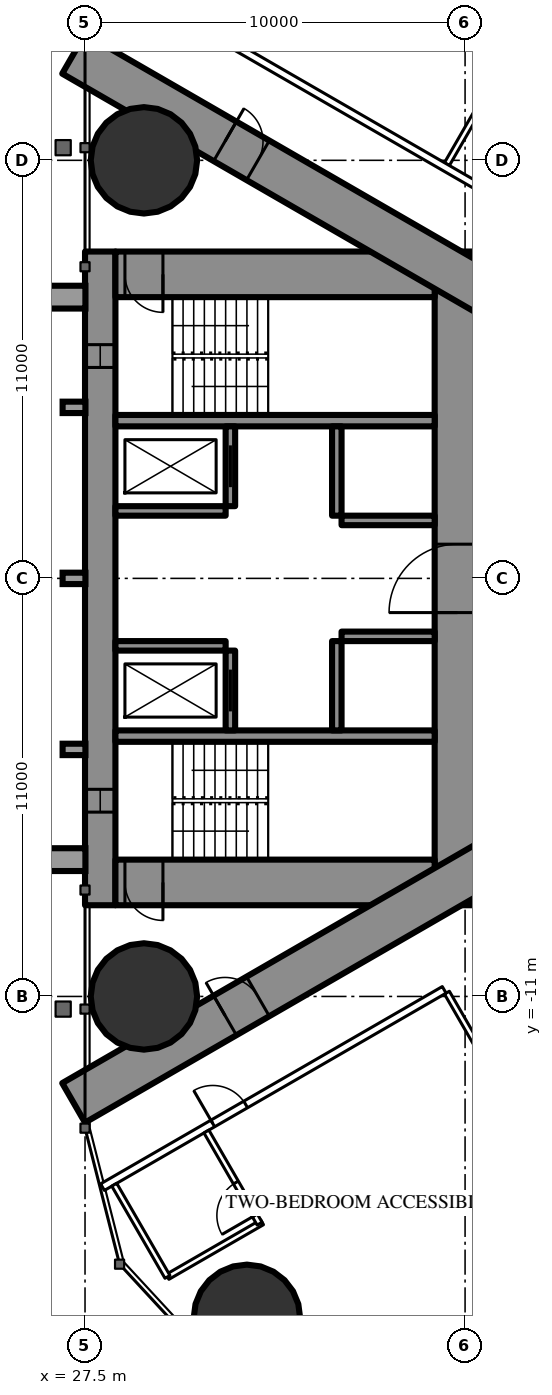
"""IFC4 building model, lengths in metres.
Left out: names, types, materials, properties, quantities, classifications, styles, units other than length and angle.
Written with IfcOpenShell. Run it as: python <this file> out.ifc"""

import sys

from ifc_helpers import new_model, si_unit, direction, frame, frame_2d, origin, origin_2d, place, context, subcontext, project, spatial, rectangle, circle, extrude, element, fill, save


model = new_model("IFC4")
c1 = context("Model", 3, precision=1e-05, world=origin(), true_north=direction((0.0, 1.0)))
c2 = subcontext(c1, "Body", "Model", "MODEL_VIEW")
j1 = project(units=[si_unit("LENGTHUNIT", "METRE"), si_unit("PLANEANGLEUNIT", "RADIAN")], contexts=[c1])
p1 = place(None, origin())
s1 = spatial("IfcSite", under=j1, at=p1, CompositionType="ELEMENT")
p2 = place(p1, origin())
s2 = spatial("IfcBuilding", under=s1, at=p2, CompositionType="ELEMENT")
p3 = place(p2, frame((0.0, 0.0, 166.8)))
s3 = spatial("IfcBuildingStorey", under=s2, at=p3, CompositionType="ELEMENT", Elevation=166.8)
for number, where, z_axis, x_axis in (
    (1, (31.76, -19.456, 0.0), (0.0, 0.0, 1.0), (1.0, 0.0, 0.0)),
    (2, (29.05, 11.0, 0.0), (0.0, 0.0, 1.0), (1.0, 0.0, 0.0)),
    (3, (29.05, -11.0, 0.0), (0.0, 0.0, 1.0), (1.0, 0.0, 0.0)),
):
    element("IfcColumn", number, at=place(p3, frame(where, z_axis=z_axis, x_axis=x_axis)), inside=s3, PredefinedType="COLUMN", context=c2, shape_type="SweptSolid", body=[
        extrude(circle(Radius=1.4, at=origin_2d()), origin(), (0.0, 0.0, 1.0), 3.5),
    ])
p4 = place(p3, frame((27.9, -8.6, 0.0), z_axis=(0.0, 0.0, 1.0), x_axis=(0.0, 1.0, 0.0)))
e4 = element("IfcWall", 4, at=p4, inside=s3, PredefinedType="SHEAR", context=c2, shape_type="SweptSolid", body=[
    extrude(rectangle(XDim=17.2, YDim=0.8, at=frame_2d((8.6, 0.0))), origin(), (0.0, 0.0, 1.0), 3.5),
])
p5 = place(p4, frame((2.45, 0.0, 0.6)))
e5 = element("IfcOpeningElement", 5, at=p5, cuts=e4, PredefinedType="OPENING", context=c2, shape_type="SweptSolid", body=[
    extrude(rectangle(XDim=0.6, YDim=2.1, at=frame_2d((0.3, 1.05))), frame((0.0, 0.41, 0.0), z_axis=(0.0, -1.0, 0.0), x_axis=(1.0, 0.0, 0.0)), (0.0, 0.0, 1.0), 0.82),
])
p6 = place(p4, frame((14.15, 0.0, 0.6)))
e6 = element("IfcOpeningElement", 6, at=p6, cuts=e4, PredefinedType="OPENING", context=c2, shape_type="SweptSolid", body=[
    extrude(rectangle(XDim=0.6, YDim=2.1, at=frame_2d((0.3, 1.05))), frame((0.0, 0.41, 0.0), z_axis=(0.0, -1.0, 0.0), x_axis=(1.0, 0.0, 0.0)), (0.0, 0.0, 1.0), 0.82),
])
p7 = place(p3, frame((37.3, -8.6, 0.0), z_axis=(0.0, 0.0, 1.0), x_axis=(0.0, 1.0, 0.0)))
e7 = element("IfcWall", 7, at=p7, inside=s3, PredefinedType="SHEAR", context=c2, shape_type="SweptSolid", body=[
    extrude(rectangle(XDim=17.2, YDim=1.2, at=frame_2d((8.6, 0.0))), origin(), (0.0, 0.0, 1.0), 3.5),
])
p8 = place(p7, frame((7.7, 0.0, 0.0)))
e8 = element("IfcOpeningElement", 8, at=p8, cuts=e7, PredefinedType="OPENING", context=c2, shape_type="SweptSolid", body=[
    extrude(rectangle(XDim=1.8, YDim=2.2, at=frame_2d((0.9, 1.1))), frame((0.0, 0.61, 0.0), z_axis=(0.0, -1.0, 0.0), x_axis=(1.0, 0.0, 0.0)), (0.0, 0.0, 1.0), 1.22),
])
p9 = place(p3, frame((28.3, -8.0, 0.0), z_axis=(0.0, 0.0, 1.0), x_axis=(1.0, 0.0, 0.0)))
e9 = element("IfcWall", 9, at=p9, inside=s3, PredefinedType="SHEAR", context=c2, shape_type="SweptSolid", body=[
    extrude(rectangle(XDim=8.4, YDim=1.2, at=frame_2d((4.2, 0.0))), origin(), (0.0, 0.0, 1.0), 3.5),
])
p10 = place(p9, frame((0.25, 0.0, 0.0)))
e10 = element("IfcOpeningElement", 10, at=p10, cuts=e9, PredefinedType="OPENING", context=c2, shape_type="SweptSolid", body=[
    extrude(rectangle(XDim=1.0, YDim=2.2, at=frame_2d((0.5, 1.1))), frame((0.0, 0.61, 0.0), z_axis=(0.0, -1.0, 0.0), x_axis=(1.0, 0.0, 0.0)), (0.0, 0.0, 1.0), 1.22),
])
p11 = place(p3, frame((28.3, 8.0, 0.0), z_axis=(0.0, 0.0, 1.0), x_axis=(1.0, 0.0, 0.0)))
e11 = element("IfcWall", 11, at=p11, inside=s3, PredefinedType="SHEAR", context=c2, shape_type="SweptSolid", body=[
    extrude(rectangle(XDim=8.4, YDim=1.2, at=frame_2d((4.2, 0.0))), origin(), (0.0, 0.0, 1.0), 3.5),
])
p12 = place(p11, frame((0.25, 0.0, 0.0)))
e12 = element("IfcOpeningElement", 12, at=p12, cuts=e11, PredefinedType="OPENING", context=c2, shape_type="SweptSolid", body=[
    extrude(rectangle(XDim=1.0, YDim=2.2, at=frame_2d((0.5, 1.1))), frame((0.0, 0.61, 0.0), z_axis=(0.0, -1.0, 0.0), x_axis=(1.0, 0.0, 0.0)), (0.0, 0.0, 1.0), 1.22),
])
for number, where, z_axis, x_axis in (
    (13, (28.3, -4.15, 0.0), (0.0, 0.0, 1.0), (1.0, 0.0, 0.0)),
    (14, (28.3, 4.15, 0.0), (0.0, 0.0, 1.0), (1.0, 0.0, 0.0)),
):
    element("IfcWall", number, at=place(p3, frame(where, z_axis=z_axis, x_axis=x_axis)), inside=s3, PredefinedType="SHEAR", context=c2, shape_type="SweptSolid", body=[
        extrude(rectangle(XDim=8.4, YDim=0.3, at=frame_2d((4.2, 0.0))), origin(), (0.0, 0.0, 1.0), 3.5),
    ])
p13 = place(p3, frame((31.325, -4.0, 0.0), z_axis=(0.0, 0.0, 1.0), x_axis=(0.0, 1.0, 0.0)))
e15 = element("IfcWall", 15, at=p13, inside=s3, PredefinedType="SHEAR", context=c2, shape_type="SweptSolid", body=[
    extrude(rectangle(XDim=2.1, YDim=0.25, at=frame_2d((1.05, 0.0))), origin(), (0.0, 0.0, 1.0), 3.5),
])
p14 = place(p13, frame((0.5, 0.0, 0.0)))
e16 = element("IfcOpeningElement", 16, at=p14, cuts=e15, PredefinedType="OPENING", context=c2, shape_type="SweptSolid", body=[
    extrude(rectangle(XDim=1.1, YDim=2.2, at=frame_2d((0.55, 1.1))), frame((0.0, 0.135, 0.0), z_axis=(0.0, -1.0, 0.0), x_axis=(1.0, 0.0, 0.0)), (0.0, 0.0, 1.0), 0.27),
])
p15 = place(p3, frame((34.125, -4.0, 0.0), z_axis=(0.0, 0.0, 1.0), x_axis=(0.0, 1.0, 0.0)))
e17 = element("IfcWall", 17, at=p15, inside=s3, PredefinedType="SHEAR", context=c2, shape_type="SweptSolid", body=[
    extrude(rectangle(XDim=2.35, YDim=0.25, at=frame_2d((1.175, 0.0))), origin(), (0.0, 0.0, 1.0), 3.5),
])
p16 = place(p3, frame((28.3, -1.775, 0.0), z_axis=(0.0, 0.0, 1.0), x_axis=(1.0, 0.0, 0.0)))
e18 = element("IfcWall", 18, at=p16, inside=s3, PredefinedType="SHEAR", context=c2, shape_type="SweptSolid", body=[
    extrude(rectangle(XDim=2.9, YDim=0.25, at=frame_2d((1.45, 0.0))), origin(), (0.0, 0.0, 1.0), 3.5),
])
p17 = place(p3, frame((34.25, -1.525, 0.0), z_axis=(0.0, 0.0, 1.0), x_axis=(1.0, 0.0, 0.0)))
e19 = element("IfcWall", 19, at=p17, inside=s3, PredefinedType="SHEAR", context=c2, shape_type="SweptSolid", body=[
    extrude(rectangle(XDim=2.45, YDim=0.25, at=frame_2d((1.225, 0.0))), origin(), (0.0, 0.0, 1.0), 3.5),
])
p18 = place(p3, frame((31.325, 1.9, 0.0), z_axis=(0.0, 0.0, 1.0), x_axis=(0.0, 1.0, 0.0)))
e20 = element("IfcWall", 20, at=p18, inside=s3, PredefinedType="SHEAR", context=c2, shape_type="SweptSolid", body=[
    extrude(rectangle(XDim=2.1, YDim=0.25, at=frame_2d((1.05, 0.0))), origin(), (0.0, 0.0, 1.0), 3.5),
])
p19 = place(p18, frame((0.5, 0.0, 0.0)))
e21 = element("IfcOpeningElement", 21, at=p19, cuts=e20, PredefinedType="OPENING", context=c2, shape_type="SweptSolid", body=[
    extrude(rectangle(XDim=1.1, YDim=2.2, at=frame_2d((0.55, 1.1))), frame((0.0, 0.135, 0.0), z_axis=(0.0, -1.0, 0.0), x_axis=(1.0, 0.0, 0.0)), (0.0, 0.0, 1.0), 0.27),
])
p20 = place(p3, frame((34.125, 1.65, 0.0), z_axis=(0.0, 0.0, 1.0), x_axis=(0.0, 1.0, 0.0)))
e22 = element("IfcWall", 22, at=p20, inside=s3, PredefinedType="SHEAR", context=c2, shape_type="SweptSolid", body=[
    extrude(rectangle(XDim=2.35, YDim=0.25, at=frame_2d((1.175, 0.0))), origin(), (0.0, 0.0, 1.0), 3.5),
])
p21 = place(p3, frame((28.3, 1.775, 0.0), z_axis=(0.0, 0.0, 1.0), x_axis=(1.0, 0.0, 0.0)))
e23 = element("IfcWall", 23, at=p21, inside=s3, PredefinedType="SHEAR", context=c2, shape_type="SweptSolid", body=[
    extrude(rectangle(XDim=2.9, YDim=0.25, at=frame_2d((1.45, 0.0))), origin(), (0.0, 0.0, 1.0), 3.5),
])
p22 = place(p3, frame((34.25, 1.525, 0.0), z_axis=(0.0, 0.0, 1.0), x_axis=(1.0, 0.0, 0.0)))
e24 = element("IfcWall", 24, at=p22, inside=s3, PredefinedType="SHEAR", context=c2, shape_type="SweptSolid", body=[
    extrude(rectangle(XDim=2.45, YDim=0.25, at=frame_2d((1.225, 0.0))), origin(), (0.0, 0.0, 1.0), 3.5),
])
p23 = place(p3, frame((27.2, -13.8, 0.0), z_axis=(0.0, 0.0, 1.0), x_axis=(0.866027159892, 0.499996958321, 0.0)))
e25 = element("IfcWall", 25, at=p23, inside=s3, PredefinedType="SHEAR", context=c2, shape_type="SweptSolid", body=[
    extrude(rectangle(XDim=27.947, YDim=1.2, at=frame_2d((13.973, 0.0))), origin(), (0.0, 0.0, 1.0), 3.5),
])
p24 = place(p23, frame((4.6, 0.0, 0.0)))
e26 = element("IfcOpeningElement", 26, at=p24, cuts=e25, PredefinedType="OPENING", context=c2, shape_type="SweptSolid", body=[
    extrude(rectangle(XDim=1.0, YDim=2.2, at=frame_2d((0.5, 1.1))), frame((0.0, 0.61, 0.0), z_axis=(0.0, -1.0, 0.0), x_axis=(1.0, 0.0, 0.0)), (0.0, 0.0, 1.0), 1.22),
])
p25 = place(p23, frame((13.395, 0.0, 0.0)))
e27 = element("IfcOpeningElement", 27, at=p25, cuts=e25, PredefinedType="OPENING", context=c2, shape_type="SweptSolid", body=[
    extrude(rectangle(XDim=1.8, YDim=2.2, at=frame_2d((0.9, 1.1))), frame((0.0, 0.61, 0.0), z_axis=(0.0, -1.0, 0.0), x_axis=(1.0, 0.0, 0.0)), (0.0, 0.0, 1.0), 1.22),
])
p26 = place(p3, frame((27.2, 13.8, 0.0), z_axis=(0.0, 0.0, 1.0), x_axis=(0.866024515034, -0.500001539357, 0.0)))
e28 = element("IfcWall", 28, at=p26, inside=s3, PredefinedType="SHEAR", context=c2, shape_type="SweptSolid", body=[
    extrude(rectangle(XDim=26.907, YDim=1.2, at=frame_2d((13.454, 0.0))), origin(), (0.0, 0.0, 1.0), 3.5),
])
p27 = place(p26, frame((4.6, 0.0, 0.0)))
e29 = element("IfcOpeningElement", 29, at=p27, cuts=e28, PredefinedType="OPENING", context=c2, shape_type="SweptSolid", body=[
    extrude(rectangle(XDim=1.0, YDim=2.2, at=frame_2d((0.5, 1.1))), frame((0.0, 0.61, 0.0), z_axis=(0.0, -1.0, 0.0), x_axis=(1.0, 0.0, 0.0)), (0.0, 0.0, 1.0), 1.22),
])
p28 = place(p26, frame((13.395, 0.0, 0.0)))
e30 = element("IfcOpeningElement", 30, at=p28, cuts=e28, PredefinedType="OPENING", context=c2, shape_type="SweptSolid", body=[
    extrude(rectangle(XDim=1.8, YDim=2.2, at=frame_2d((0.9, 1.1))), frame((0.0, 0.61, 0.0), z_axis=(0.0, -1.0, 0.0), x_axis=(1.0, 0.0, 0.0)), (0.0, 0.0, 1.0), 1.22),
])
for number, where, z_axis, x_axis in (
    (31, (37.022, -10.9, 0.0), (0.0, 0.0, 1.0), (0.5, -0.866, 0.0)),
    (32, (37.022, 10.9, 0.0), (0.0, 0.0, 1.0), (0.5, 0.866, 0.0)),
):
    element("IfcWall", number, at=place(p3, frame(where, z_axis=z_axis, x_axis=x_axis)), inside=s3, PredefinedType="PARTITIONING", context=c2, shape_type="SweptSolid", body=[
        extrude(rectangle(XDim=9.77, YDim=0.15, at=frame_2d((4.885, 0.0))), origin(), (0.0, 0.0, 1.0), 3.25),
    ])
p29 = place(p3, frame((27.959, 16.017, 0.0), z_axis=(0.0, 0.0, 1.0), x_axis=(0.866027146794, -0.499996981007, 0.0)))
e33 = element("IfcWall", 33, at=p29, inside=s3, PredefinedType="PARTITIONING", context=c2, shape_type="SweptSolid", body=[
    extrude(rectangle(XDim=21.657, YDim=0.2, at=frame_2d((10.829, 0.0))), origin(), (0.0, 0.0, 1.0), 3.25),
])
p30 = place(p29, frame((15.391, 0.0, 0.0)))
e34 = element("IfcOpeningElement", 34, at=p30, cuts=e33, PredefinedType="OPENING", context=c2, shape_type="SweptSolid", body=[
    extrude(rectangle(XDim=0.95, YDim=2.2, at=frame_2d((0.475, 1.1))), frame((0.0, 0.11, 0.0), z_axis=(0.0, -1.0, 0.0), x_axis=(1.0, 0.0, 0.0)), (0.0, 0.0, 1.0), 0.22),
])
p31 = place(p29, frame((13.409, 0.0, 0.0)))
e35 = element("IfcOpeningElement", 35, at=p31, cuts=e33, PredefinedType="OPENING", context=c2, shape_type="SweptSolid", body=[
    extrude(rectangle(XDim=0.95, YDim=2.2, at=frame_2d((0.475, 1.1))), frame((0.0, 0.11, 0.0), z_axis=(0.0, -1.0, 0.0), x_axis=(1.0, 0.0, 0.0)), (0.0, 0.0, 1.0), 0.22),
])
p32 = place(p29, frame((0.6, 0.0, 0.0)))
e36 = element("IfcOpeningElement", 36, at=p32, cuts=e33, PredefinedType="OPENING", context=c2, shape_type="SweptSolid", body=[
    extrude(rectangle(XDim=0.95, YDim=2.2, at=frame_2d((0.475, 1.1))), frame((0.0, 0.11, 0.0), z_axis=(0.0, -1.0, 0.0), x_axis=(1.0, 0.0, 0.0)), (0.0, 0.0, 1.0), 0.22),
])
p33 = place(p29, frame((19.349, 0.0, 0.0)))
e37 = element("IfcOpeningElement", 37, at=p33, cuts=e33, PredefinedType="OPENING", context=c2, shape_type="SweptSolid", body=[
    extrude(rectangle(XDim=1.8, YDim=2.2, at=frame_2d((0.9, 1.1))), frame((0.0, 0.11, 0.0), z_axis=(0.0, -1.0, 0.0), x_axis=(1.0, 0.0, 0.0)), (0.0, 0.0, 1.0), 0.22),
])
p34 = place(p3, frame((27.959, -16.017, 0.0), z_axis=(0.0, 0.0, 1.0), x_axis=(0.866026201739, 0.499998617899, 0.0)))
e38 = element("IfcWall", 38, at=p34, inside=s3, PredefinedType="PARTITIONING", context=c2, shape_type="SweptSolid", body=[
    extrude(rectangle(XDim=10.382, YDim=0.2, at=frame_2d((5.191, 0.0))), origin(), (0.0, 0.0, 1.0), 3.25),
])
p35 = place(p34, frame((3.35, 0.0, 0.0)))
e39 = element("IfcOpeningElement", 39, at=p35, cuts=e38, PredefinedType="OPENING", context=c2, shape_type="SweptSolid", body=[
    extrude(rectangle(XDim=1.0, YDim=2.2, at=frame_2d((0.5, 1.1))), frame((0.0, 0.11, 0.0), z_axis=(0.0, -1.0, 0.0), x_axis=(1.0, 0.0, 0.0)), (0.0, 0.0, 1.0), 0.22),
])
p36 = place(p3, frame((29.669, -18.379, 0.0), z_axis=(0.0, 0.0, 1.0), x_axis=(0.866039941686, 0.499974818771, 0.0)))
e40 = element("IfcWall", 40, at=p36, inside=s3, PredefinedType="PARTITIONING", context=c2, shape_type="SweptSolid", body=[
    extrude(rectangle(XDim=2.875, YDim=0.15, at=frame_2d((1.438, 0.0))), origin(), (0.0, 0.0, 1.0), 3.25),
])
p37 = place(p3, frame((30.694, -14.554, 0.0), z_axis=(0.0, 0.0, 1.0), x_axis=(0.500049511043, -0.865996816683, 0.0)))
e41 = element("IfcWall", 41, at=p37, inside=s3, PredefinedType="PARTITIONING", context=c2, shape_type="SweptSolid", body=[
    extrude(rectangle(XDim=2.8, YDim=0.15, at=frame_2d((1.4, 0.0))), origin(), (0.0, 0.0, 1.0), 2.3),
])
p38 = place(p37, frame((1.55, 0.0, 0.0)))
e42 = element("IfcOpeningElement", 42, at=p38, cuts=e41, PredefinedType="OPENING", context=c2, shape_type="SweptSolid", body=[
    extrude(rectangle(XDim=1.0, YDim=2.2, at=frame_2d((0.5, 1.1))), frame((0.0, 0.085, 0.0), z_axis=(0.0, -1.0, 0.0), x_axis=(1.0, 0.0, 0.0)), (0.0, 0.0, 1.0), 0.17),
])
p39 = place(p3, frame((28.269, -15.954, 0.0), z_axis=(0.0, 0.0, 1.0), x_axis=(0.49998411664, -0.866034573852, 0.0)))
e43 = element("IfcWall", 43, at=p39, inside=s3, PredefinedType="PARTITIONING", context=c2, shape_type="SweptSolid", body=[
    extrude(rectangle(XDim=2.8, YDim=0.15, at=frame_2d((1.4, 0.0))), origin(), (0.0, 0.0, 1.0), 3.25),
])
p40 = place(p38, origin())
e44 = element("IfcDoor", 44, at=p40, inside=s3, OperationType="SINGLE_SWING_RIGHT", PredefinedType="DOOR", context=c2, shape_type="SweptSolid", body=[
    extrude(rectangle(XDim=1.0, YDim=2.2, at=frame_2d((0.5, 1.1))), frame((0.0, 0.025, 0.0), z_axis=(0.0, -1.0, 0.0), x_axis=(1.0, 0.0, 0.0)), (0.0, 0.0, 1.0), 0.05),
])
fill(e42, e44)
p41 = place(p35, origin())
e45 = element("IfcDoor", 45, at=p41, inside=s3, OperationType="SINGLE_SWING_LEFT", PredefinedType="DOOR", context=c2, shape_type="SweptSolid", body=[
    extrude(rectangle(XDim=1.0, YDim=2.2, at=frame_2d((0.5, 1.1))), frame((0.0, 0.025, 0.0), z_axis=(0.0, -1.0, 0.0), x_axis=(1.0, 0.0, 0.0)), (0.0, 0.0, 1.0), 0.05),
])
fill(e39, e45)
p42 = place(p24, origin())
e46 = element("IfcDoor", 46, at=p42, inside=s3, OperationType="SINGLE_SWING_LEFT", PredefinedType="DOOR", context=c2, shape_type="SweptSolid", body=[
    extrude(rectangle(XDim=1.0, YDim=2.2, at=frame_2d((0.5, 1.1))), frame((0.0, 0.025, 0.0), z_axis=(0.0, -1.0, 0.0), x_axis=(1.0, 0.0, 0.0)), (0.0, 0.0, 1.0), 0.05),
])
fill(e26, e46)
p43 = place(p27, origin())
e47 = element("IfcDoor", 47, at=p43, inside=s3, OperationType="SINGLE_SWING_LEFT", PredefinedType="DOOR", context=c2, shape_type="SweptSolid", body=[
    extrude(rectangle(XDim=1.0, YDim=2.2, at=frame_2d((0.5, 1.1))), frame((0.0, 0.025, 0.0), z_axis=(0.0, -1.0, 0.0), x_axis=(1.0, 0.0, 0.0)), (0.0, 0.0, 1.0), 0.05),
])
fill(e29, e47)
p44 = place(p8, origin())
e48 = element("IfcDoor", 48, at=p44, inside=s3, OperationType="DOUBLE_DOOR_SINGLE_SWING", PredefinedType="DOOR", context=c2, shape_type="SweptSolid", body=[
    extrude(rectangle(XDim=1.8, YDim=2.2, at=frame_2d((0.9, 1.1))), frame((0.0, 0.025, 0.0), z_axis=(0.0, -1.0, 0.0), x_axis=(1.0, 0.0, 0.0)), (0.0, 0.0, 1.0), 0.05),
])
fill(e8, e48)
p45 = place(p10, origin())
e49 = element("IfcDoor", 49, at=p45, inside=s3, OperationType="SINGLE_SWING_RIGHT", PredefinedType="DOOR", context=c2, shape_type="SweptSolid", body=[
    extrude(rectangle(XDim=1.0, YDim=2.2, at=frame_2d((0.5, 1.1))), frame((0.0, 0.025, 0.0), z_axis=(0.0, -1.0, 0.0), x_axis=(1.0, 0.0, 0.0)), (0.0, 0.0, 1.0), 0.05),
])
fill(e10, e49)
p46 = place(p12, origin())
e50 = element("IfcDoor", 50, at=p46, inside=s3, OperationType="SINGLE_SWING_RIGHT", PredefinedType="DOOR", context=c2, shape_type="SweptSolid", body=[
    extrude(rectangle(XDim=1.0, YDim=2.2, at=frame_2d((0.5, 1.1))), frame((0.0, 0.025, 0.0), z_axis=(0.0, -1.0, 0.0), x_axis=(1.0, 0.0, 0.0)), (0.0, 0.0, 1.0), 0.05),
])
fill(e12, e50)
p47 = place(p14, origin())
e51 = element("IfcDoor", 51, at=p47, inside=s3, OperationType="SLIDING_TO_LEFT", PredefinedType="USERDEFINED", context=c2, shape_type="SweptSolid", body=[
    extrude(rectangle(XDim=1.1, YDim=2.2, at=frame_2d((0.55, 1.1))), frame((0.0, 0.025, 0.0), z_axis=(0.0, -1.0, 0.0), x_axis=(1.0, 0.0, 0.0)), (0.0, 0.0, 1.0), 0.05),
])
fill(e16, e51)
p48 = place(p19, origin())
e52 = element("IfcDoor", 52, at=p48, inside=s3, OperationType="SLIDING_TO_LEFT", PredefinedType="USERDEFINED", context=c2, shape_type="SweptSolid", body=[
    extrude(rectangle(XDim=1.1, YDim=2.2, at=frame_2d((0.55, 1.1))), frame((0.0, 0.025, 0.0), z_axis=(0.0, -1.0, 0.0), x_axis=(1.0, 0.0, 0.0)), (0.0, 0.0, 1.0), 0.05),
])
fill(e21, e52)
p49 = place(p5, origin())
e53 = element("IfcWindow", 53, at=p49, inside=s3, PartitioningType="SINGLE_PANEL", PredefinedType="WINDOW", context=c2, shape_type="SweptSolid", body=[
    extrude(rectangle(XDim=0.6, YDim=2.1, at=frame_2d((0.3, 1.05))), frame((0.0, 0.03, 0.0), z_axis=(0.0, -1.0, 0.0), x_axis=(1.0, 0.0, 0.0)), (0.0, 0.0, 1.0), 0.06),
])
fill(e5, e53)
p50 = place(p6, origin())
e54 = element("IfcWindow", 54, at=p50, inside=s3, PartitioningType="SINGLE_PANEL", PredefinedType="WINDOW", context=c2, shape_type="SweptSolid", body=[
    extrude(rectangle(XDim=0.6, YDim=2.1, at=frame_2d((0.3, 1.05))), frame((0.0, 0.03, 0.0), z_axis=(0.0, -1.0, 0.0), x_axis=(1.0, 0.0, 0.0)), (0.0, 0.0, 1.0), 0.06),
])
fill(e6, e54)
save(model, sys.argv[1])
